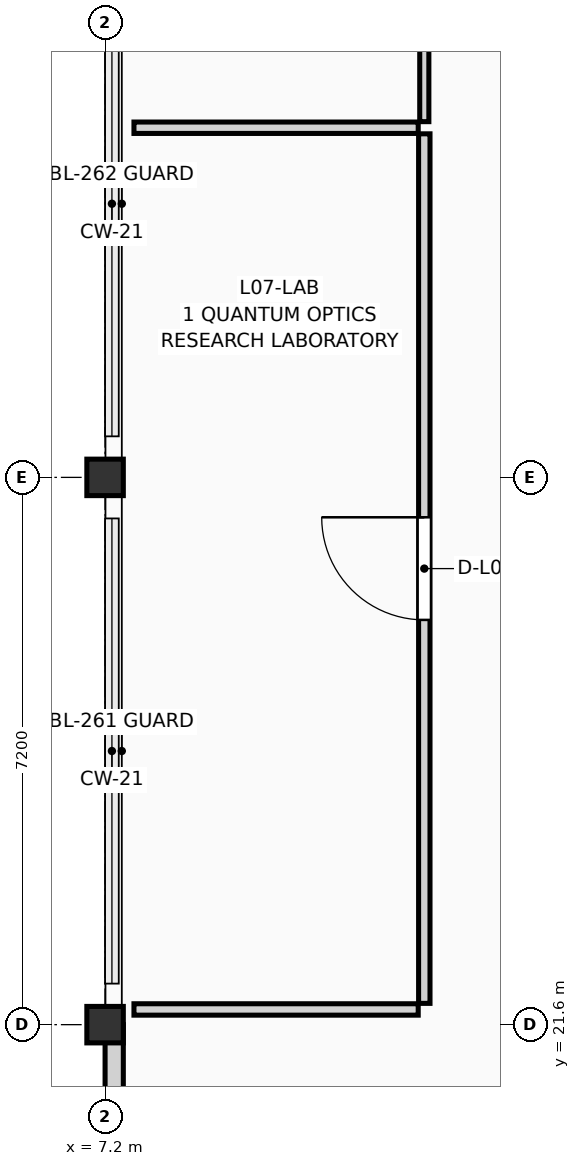
"""IFC4 building model, lengths in metres.
Left out: names, types, materials, properties, quantities, classifications, styles, units other than length and angle.
Written with IfcOpenShell. Run it as: python <this file> out.ifc"""

import sys

from ifc_helpers import new_model, si_unit, direction, frame, frame_2d, origin, origin_2d, place, context, subcontext, project, spatial, rectangle, extrude, element, fill, save


model = new_model("IFC4")
c1 = context("Model", 3, precision=1e-05, world=origin(), true_north=direction((0.0, 1.0)))
c2 = subcontext(c1, "Body", "Model", "MODEL_VIEW")
j1 = project(units=[si_unit("LENGTHUNIT", "METRE"), si_unit("PLANEANGLEUNIT", "RADIAN")], contexts=[c1])
p1 = place(None, origin())
s1 = spatial("IfcSite", under=j1, at=p1, CompositionType="ELEMENT")
p2 = place(p1, origin())
s2 = spatial("IfcBuilding", under=s1, at=p2, CompositionType="ELEMENT")
p3 = place(p2, frame((0.0, 0.0, 26.25)))
s3 = spatial("IfcBuildingStorey", under=s2, at=p3, CompositionType="ELEMENT", Elevation=26.25)
for number, where, z_axis, x_axis in (
    (1, (7.2, 21.6, 0.0), (0.0, 0.0, 1.0), (1.0, 0.0, 0.0)),
    (2, (7.2, 28.8, 0.0), (0.0, 0.0, 1.0), (1.0, 0.0, 0.0)),
):
    element("IfcColumn", number, at=place(p3, frame(where, z_axis=z_axis, x_axis=x_axis)), inside=s3, PredefinedType="COLUMN", context=c2, shape_type="SweptSolid", body=[
        extrude(rectangle(XDim=0.48, YDim=0.48, at=origin_2d()), origin(), (0.0, 0.0, 1.0), 3.45),
    ])
p4 = place(p3, frame((7.32, 14.4, 0.0), z_axis=(0.0, 0.0, 1.0), x_axis=(0.0, 1.0, 0.0)))
e3 = element("IfcWall", 3, at=p4, inside=s3, PredefinedType="SOLIDWALL", context=c2, shape_type="SweptSolid", body=[
    extrude(rectangle(XDim=7.2, YDim=0.24, at=frame_2d((3.6, 0.0))), origin(), (0.0, 0.0, 1.0), 2.69),
])
p5 = place(p3, frame((7.58, 21.8, 0.0), z_axis=(0.0, 0.0, 1.0), x_axis=(1.0, 0.0, 0.0)))
e4 = element("IfcWall", 4, at=p5, inside=s3, PredefinedType="PARTITIONING", context=c2, shape_type="SweptSolid", body=[
    extrude(rectangle(XDim=3.74, YDim=0.15, at=frame_2d((1.87, 0.0))), origin(), (0.0, 0.0, 1.0), 2.541),
])
p6 = place(p3, frame((11.4, 21.88, 0.0), z_axis=(0.0, 0.0, 1.0), x_axis=(0.0, 1.0, 0.0)))
e5 = element("IfcWall", 5, at=p6, inside=s3, PredefinedType="PARTITIONING", context=c2, shape_type="SweptSolid", body=[
    extrude(rectangle(XDim=11.44, YDim=0.15, at=frame_2d((5.72, 0.0))), origin(), (0.0, 0.0, 1.0), 3.225),
])
p7 = place(p6, frame((5.045, 0.0, 0.0)))
e6 = element("IfcOpeningElement", 6, at=p7, cuts=e5, PredefinedType="OPENING", context=c2, shape_type="SweptSolid", body=[
    extrude(rectangle(XDim=1.35, YDim=2.2, at=frame_2d((0.675, 1.1))), frame((0.0, 0.087, 0.0), z_axis=(0.0, -1.0, 0.0), x_axis=(1.0, 0.0, 0.0)), (0.0, 0.0, 1.0), 0.174),
])
p8 = place(p3, frame((7.58, 33.4, 0.0), z_axis=(0.0, 0.0, 1.0), x_axis=(1.0, 0.0, 0.0)))
e7 = element("IfcWall", 7, at=p8, inside=s3, PredefinedType="PARTITIONING", context=c2, shape_type="SweptSolid", body=[
    extrude(rectangle(XDim=3.74, YDim=0.15, at=frame_2d((1.87, 0.0))), origin(), (0.0, 0.0, 1.0), 3.225),
])
p9 = place(p3, frame((11.4, 33.48, 0.0), z_axis=(0.0, 0.0, 1.0), x_axis=(0.0, 1.0, 0.0)))
e8 = element("IfcWall", 8, at=p9, inside=s3, PredefinedType="PARTITIONING", context=c2, shape_type="SweptSolid", body=[
    extrude(rectangle(XDim=11.24, YDim=0.12, at=frame_2d((5.62, 0.0))), origin(), (0.0, 0.0, 1.0), 3.225),
])
p10 = place(p9, frame((4.96, 0.0, 0.0)))
e9 = element("IfcOpeningElement", 9, at=p10, cuts=e8, PredefinedType="OPENING", context=c2, shape_type="SweptSolid", body=[
    extrude(rectangle(XDim=1.32, YDim=2.2, at=frame_2d((0.66, 1.1))), frame((0.0, 0.072, 0.0), z_axis=(0.0, -1.0, 0.0), x_axis=(1.0, 0.0, 0.0)), (0.0, 0.0, 1.0), 0.144),
])
p11 = place(p7, origin())
e10 = element("IfcDoor", 10, at=p11, inside=s3, OperationType="SINGLE_SWING_RIGHT", PredefinedType="DOOR", context=c2, shape_type="SweptSolid", body=[
    extrude(rectangle(XDim=1.35, YDim=2.2, at=frame_2d((0.675, 1.1))), frame((0.0, 0.025, 0.0), z_axis=(0.0, -1.0, 0.0), x_axis=(1.0, 0.0, 0.0)), (0.0, 0.0, 1.0), 0.05),
])
fill(e6, e10)
save(model, sys.argv[1])
